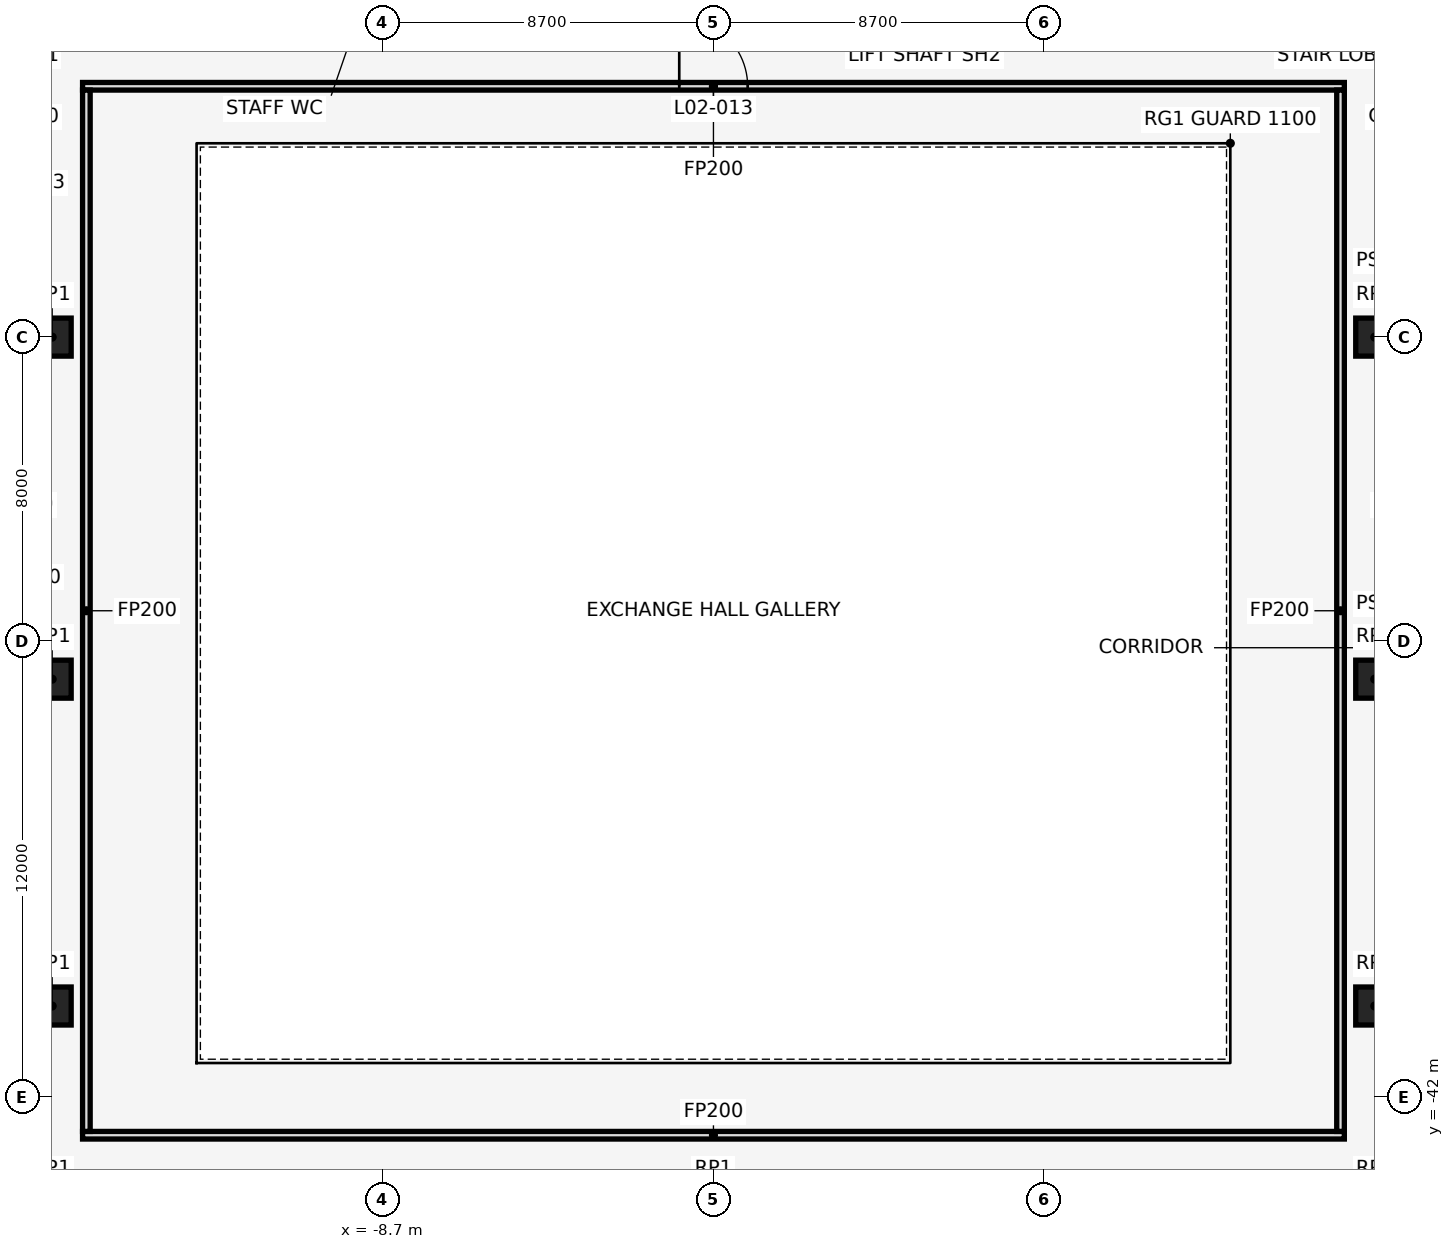
"""IFC4 building model, lengths in metres.
Left out: names, types, materials, properties, quantities, classifications, styles, units other than length and angle.
Written with IfcOpenShell. Run it as: python <this file> out.ifc"""

import sys

from ifc_helpers import new_model, si_unit, direction, frame, frame_2d, origin, origin_2d, place, context, subcontext, project, spatial, rectangle, extrude, element, fill, save


model = new_model("IFC4")
c1 = context("Model", 3, precision=1e-05, world=origin(), true_north=direction((0.0, 1.0)))
c2 = subcontext(c1, "Body", "Model", "MODEL_VIEW")
j1 = project(units=[si_unit("LENGTHUNIT", "METRE"), si_unit("PLANEANGLEUNIT", "RADIAN")], contexts=[c1])
p1 = place(None, origin())
s1 = spatial("IfcSite", under=j1, at=p1, CompositionType="ELEMENT")
p2 = place(p1, origin())
s2 = spatial("IfcBuilding", under=s1, at=p2, CompositionType="ELEMENT")
p3 = place(p2, frame((0.0, 0.0, 14.0)))
s3 = spatial("IfcBuildingStorey", under=s2, at=p3, CompositionType="ELEMENT", Elevation=14.0)
for number, where, z_axis, x_axis in (
    (1, (-17.4, -39.6, 0.0), (0.0, 0.0, 1.0), (1.0, 0.0, 0.0)),
    (2, (17.4, -39.6, 0.0), (0.0, 0.0, 1.0), (1.0, 0.0, 0.0)),
    (3, (-17.4, -22.0, 0.0), (0.0, 0.0, 1.0), (1.0, 0.0, 0.0)),
    (4, (17.4, -22.0, 0.0), (0.0, 0.0, 1.0), (1.0, 0.0, 0.0)),
    (5, (-17.4, -31.0, 0.0), (0.0, 0.0, 1.0), (1.0, 0.0, 0.0)),
    (6, (17.4, -31.0, 0.0), (0.0, 0.0, 1.0), (1.0, 0.0, 0.0)),
):
    element("IfcColumn", number, at=place(p3, frame(where, z_axis=z_axis, x_axis=x_axis)), inside=s3, PredefinedType="COLUMN", context=c2, shape_type="SweptSolid", body=[
        extrude(rectangle(XDim=1.0, YDim=1.0, at=origin_2d()), origin(), (0.0, 0.0, 1.0), 6.0),
    ])
p4 = place(p3, frame((-16.6, -43.0, 0.0), z_axis=(0.0, 0.0, 1.0), x_axis=(1.0, 0.0, 0.0)))
e7 = element("IfcWall", 7, at=p4, inside=s3, PredefinedType="PARTITIONING", context=c2, shape_type="SweptSolid", body=[
    extrude(rectangle(XDim=33.2, YDim=0.2, at=frame_2d((16.6, 0.0))), origin(), (0.0, 0.0, 1.0), 5.7),
])
p5 = place(p3, frame((-16.6, -15.4, 0.0), z_axis=(0.0, 0.0, 1.0), x_axis=(1.0, 0.0, 0.0)))
e8 = element("IfcWall", 8, at=p5, inside=s3, PredefinedType="PARTITIONING", context=c2, shape_type="SweptSolid", body=[
    extrude(rectangle(XDim=33.2, YDim=0.2, at=frame_2d((16.6, 0.0))), origin(), (0.0, 0.0, 1.0), 5.7),
])
p6 = place(p5, frame((15.7, 0.0, 0.0)))
e9 = element("IfcOpeningElement", 9, at=p6, cuts=e8, PredefinedType="OPENING", context=c2, shape_type="SweptSolid", body=[
    extrude(rectangle(XDim=1.8, YDim=2.1, at=frame_2d((0.9, 1.05))), frame((0.0, 0.112, 0.0), z_axis=(0.0, -1.0, 0.0), x_axis=(1.0, 0.0, 0.0)), (0.0, 0.0, 1.0), 0.224),
])
for number, where, z_axis, x_axis in (
    (10, (-16.5, -42.9, 0.0), (0.0, 0.0, 1.0), (0.0, 1.0, 0.0)),
    (11, (16.5, -42.9, 0.0), (0.0, 0.0, 1.0), (0.0, 1.0, 0.0)),
):
    element("IfcWall", number, at=place(p3, frame(where, z_axis=z_axis, x_axis=x_axis)), inside=s3, PredefinedType="PARTITIONING", context=c2, shape_type="SweptSolid", body=[
        extrude(rectangle(XDim=27.4, YDim=0.2, at=frame_2d((13.7, 0.0))), origin(), (0.0, 0.0, 1.0), 5.7),
    ])
p7 = place(p6, origin())
e12 = element("IfcDoor", 12, at=p7, inside=s3, OperationType="SINGLE_SWING_LEFT", PredefinedType="DOOR", context=c2, shape_type="SweptSolid", body=[
    extrude(rectangle(XDim=1.8, YDim=2.1, at=frame_2d((0.9, 1.05))), frame((0.0, 0.025, 0.0), z_axis=(0.0, -1.0, 0.0), x_axis=(1.0, 0.0, 0.0)), (0.0, 0.0, 1.0), 0.05),
])
fill(e9, e12)
save(model, sys.argv[1])
